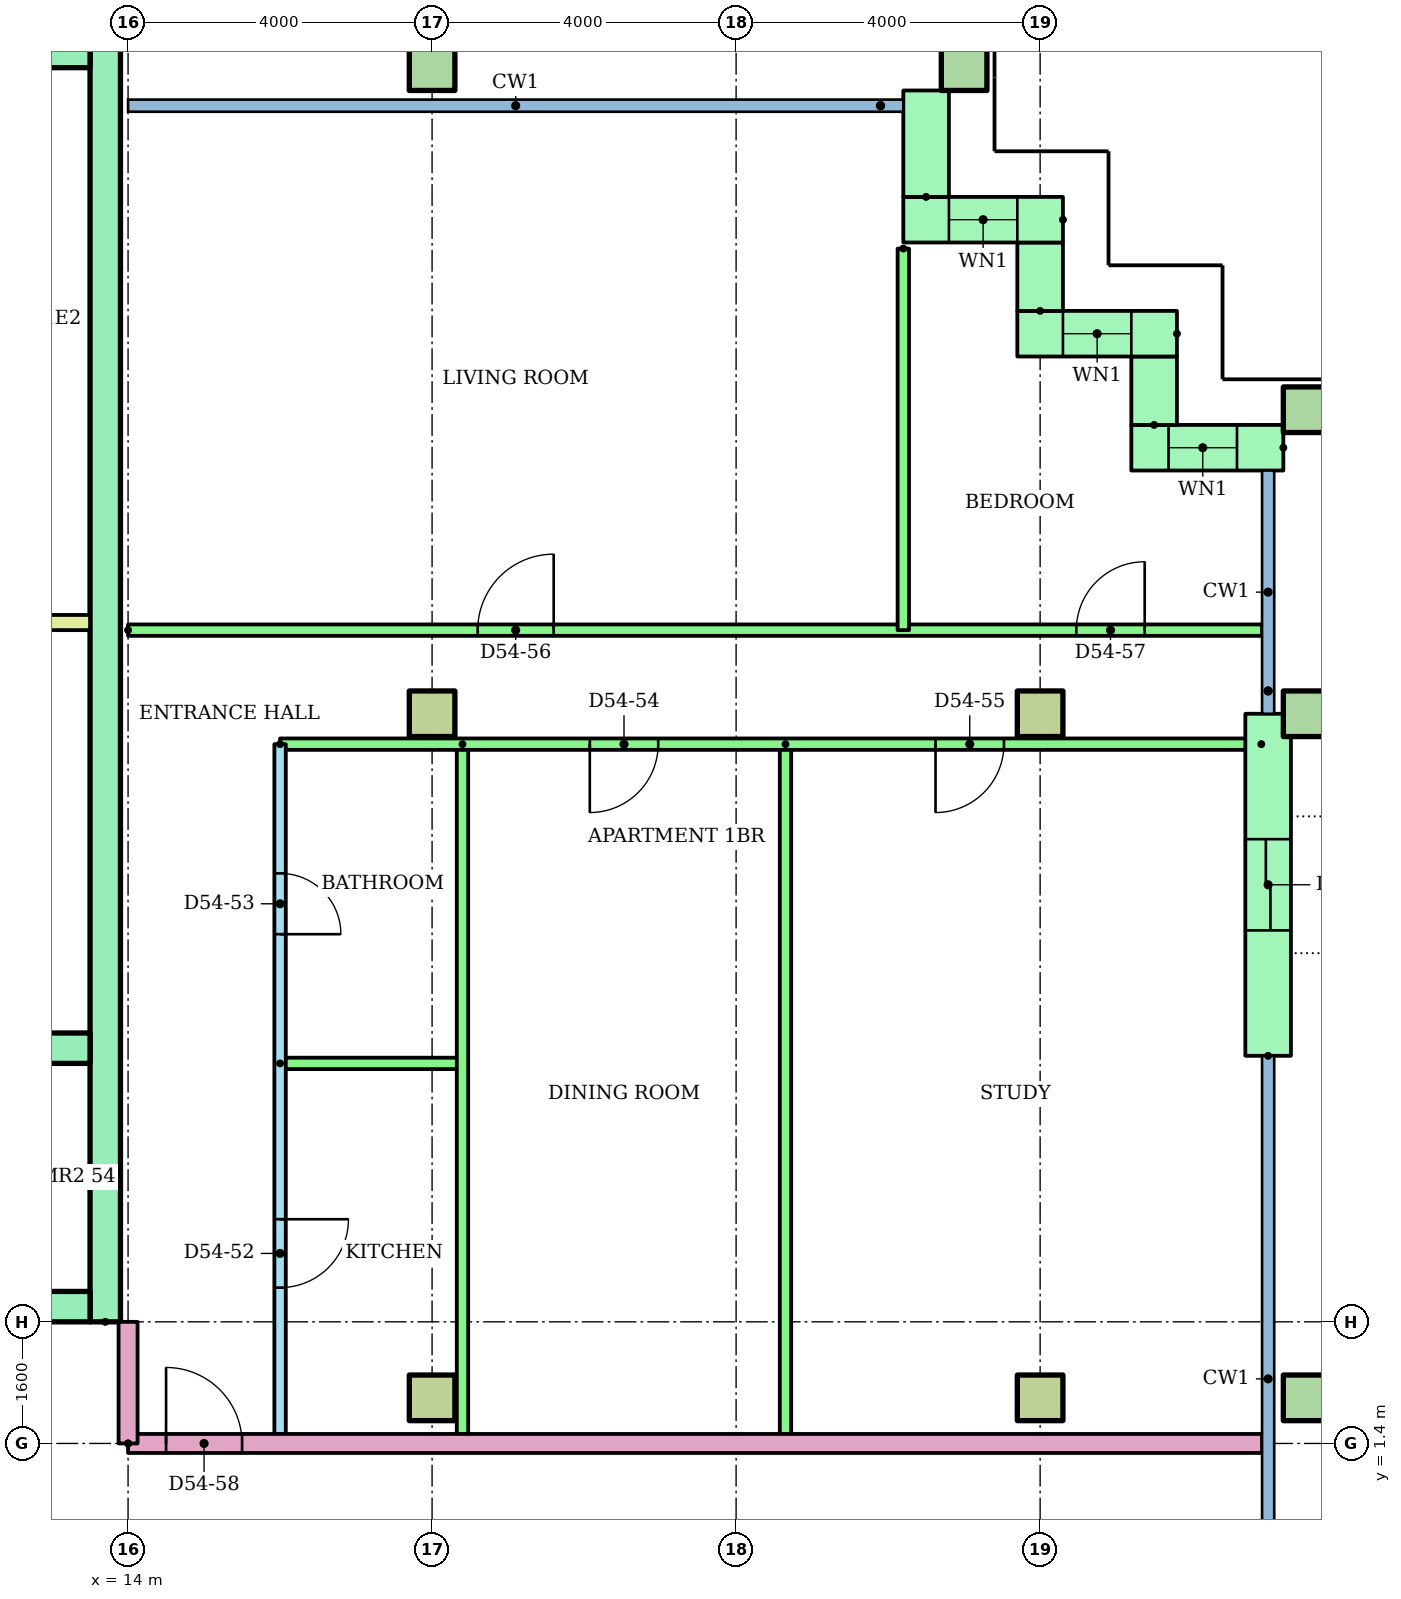
"""IFC4 building model, lengths in metres.
Left out: names, types, materials, properties, quantities, classifications, styles, units other than length and angle.
Written with IfcOpenShell. Run it as: python <this file> out.ifc"""

import sys

from ifc_helpers import new_model, si_unit, direction, frame, frame_2d, origin, origin_2d, place, context, subcontext, project, spatial, rectangle, hollow_rectangle, extrude, element, fill, save


model = new_model("IFC4")
c1 = context("Model", 3, precision=1e-05, world=origin(), true_north=direction((0.0, 1.0)))
c2 = subcontext(c1, "Body", "Model", "MODEL_VIEW")
j1 = project(units=[si_unit("LENGTHUNIT", "METRE"), si_unit("PLANEANGLEUNIT", "RADIAN")], contexts=[c1])
p1 = place(None, origin())
s1 = spatial("IfcSite", under=j1, at=p1, CompositionType="ELEMENT")
p2 = place(p1, origin())
s2 = spatial("IfcBuilding", under=s1, at=p2, CompositionType="ELEMENT")
p3 = place(p2, frame((0.0, 0.0, 210.8)))
s3 = spatial("IfcBuildingStorey", under=s2, at=p3, CompositionType="ELEMENT", Elevation=210.8)
for number, where in (
    (1, (18.0, 2.0, 0.0)),
    (2, (26.0, 2.0, 0.0)),
):
    element("IfcColumn", number, at=place(p3, frame(where)), inside=s3, PredefinedType="COLUMN", context=c2, shape_type="SweptSolid", body=[
        extrude(rectangle(XDim=0.6, YDim=0.6, at=origin_2d()), origin(), (0.0, 0.0, 1.0), 3.2),
    ])
p4 = place(p3, frame((29.5, 2.0, 0.0)))
e3 = element("IfcColumn", 3, at=p4, inside=s3, PredefinedType="COLUMN", context=c2, shape_type="SweptSolid", body=[
    extrude(hollow_rectangle(XDim=0.6, YDim=0.6, WallThickness=0.03, at=origin_2d()), origin(), (0.0, 0.0, 1.0), 3.2),
])
for number, where in (
    (4, (18.0, 11.0, 0.0)),
    (5, (26.0, 11.0, 0.0)),
):
    element("IfcColumn", number, at=place(p3, frame(where)), inside=s3, PredefinedType="COLUMN", context=c2, shape_type="SweptSolid", body=[
        extrude(rectangle(XDim=0.6, YDim=0.6, at=origin_2d()), origin(), (0.0, 0.0, 1.0), 3.2),
    ])
for number, where in (
    (6, (29.5, 11.0, 0.0)),
    (7, (29.5, 15.0, 0.0)),
    (8, (18.0, 19.5, 0.0)),
    (9, (25.0, 19.5, 0.0)),
):
    element("IfcColumn", number, at=place(p3, frame(where)), inside=s3, PredefinedType="COLUMN", context=c2, shape_type="SweptSolid", body=[
        extrude(hollow_rectangle(XDim=0.6, YDim=0.6, WallThickness=0.03, at=origin_2d()), origin(), (0.0, 0.0, 1.0), 3.2),
    ])
p5 = place(p3, frame((29.2, 14.5, 0.0), z_axis=(0.0, 0.0, 1.0), x_axis=(-1.0, 0.0, 0.0)))
e10 = element("IfcWall", 10, at=p5, inside=s3, PredefinedType="STANDARD", context=c2, shape_type="SweptSolid", body=[
    extrude(rectangle(XDim=2.0, YDim=0.6, at=frame_2d((1.0, 0.0))), origin(), (0.0, 0.0, 1.0), 2.92),
])
p6 = place(p5, frame((0.61, 0.0, 0.9)))
e11 = element("IfcOpeningElement", 11, at=p6, cuts=e10, PredefinedType="OPENING", context=c2, shape_type="SweptSolid", body=[
    extrude(rectangle(XDim=0.9, YDim=1.5, at=frame_2d((0.45, 0.75))), frame((0.0, 0.31, 0.0), z_axis=(0.0, -1.0, 0.0), x_axis=(1.0, 0.0, 0.0)), (0.0, 0.0, 1.0), 0.62),
])
p7 = place(p3, frame((27.5, 14.8, 0.0), z_axis=(0.0, 0.0, 1.0), x_axis=(0.0, 1.0, 0.0)))
e12 = element("IfcWall", 12, at=p7, inside=s3, PredefinedType="STANDARD", context=c2, shape_type="SweptSolid", body=[
    extrude(rectangle(XDim=0.9, YDim=0.6, at=frame_2d((0.45, 0.0))), origin(), (0.0, 0.0, 1.0), 2.92),
])
p8 = place(p3, frame((27.8, 16.0, 0.0), z_axis=(0.0, 0.0, 1.0), x_axis=(-1.0, 0.0, 0.0)))
e13 = element("IfcWall", 13, at=p8, inside=s3, PredefinedType="STANDARD", context=c2, shape_type="SweptSolid", body=[
    extrude(rectangle(XDim=2.1, YDim=0.6, at=frame_2d((1.05, 0.0))), origin(), (0.0, 0.0, 1.0), 2.92),
])
p9 = place(p8, frame((0.6, 0.0, 0.9)))
e14 = element("IfcOpeningElement", 14, at=p9, cuts=e13, PredefinedType="OPENING", context=c2, shape_type="SweptSolid", body=[
    extrude(rectangle(XDim=0.9, YDim=1.5, at=frame_2d((0.45, 0.75))), frame((0.0, 0.31, 0.0), z_axis=(0.0, -1.0, 0.0), x_axis=(1.0, 0.0, 0.0)), (0.0, 0.0, 1.0), 0.62),
])
p10 = place(p3, frame((26.0, 16.3, 0.0), z_axis=(0.0, 0.0, 1.0), x_axis=(0.0, 1.0, 0.0)))
e15 = element("IfcWall", 15, at=p10, inside=s3, PredefinedType="STANDARD", context=c2, shape_type="SweptSolid", body=[
    extrude(rectangle(XDim=0.9, YDim=0.6, at=frame_2d((0.45, 0.0))), origin(), (0.0, 0.0, 1.0), 2.92),
])
p11 = place(p3, frame((26.3, 17.5, 0.0), z_axis=(0.0, 0.0, 1.0), x_axis=(-1.0, 0.0, 0.0)))
e16 = element("IfcWall", 16, at=p11, inside=s3, PredefinedType="STANDARD", context=c2, shape_type="SweptSolid", body=[
    extrude(rectangle(XDim=2.1, YDim=0.6, at=frame_2d((1.05, 0.0))), origin(), (0.0, 0.0, 1.0), 2.92),
])
p12 = place(p11, frame((0.6, 0.0, 0.9)))
e17 = element("IfcOpeningElement", 17, at=p12, cuts=e16, PredefinedType="OPENING", context=c2, shape_type="SweptSolid", body=[
    extrude(rectangle(XDim=0.9, YDim=1.5, at=frame_2d((0.45, 0.75))), frame((0.0, 0.31, 0.0), z_axis=(0.0, -1.0, 0.0), x_axis=(1.0, 0.0, 0.0)), (0.0, 0.0, 1.0), 0.62),
])
p13 = place(p3, frame((24.5, 17.8, 0.0), z_axis=(0.0, 0.0, 1.0), x_axis=(0.0, 1.0, 0.0)))
e18 = element("IfcWall", 18, at=p13, inside=s3, PredefinedType="STANDARD", context=c2, shape_type="SweptSolid", body=[
    extrude(rectangle(XDim=1.4, YDim=0.6, at=frame_2d((0.7, 0.0))), origin(), (0.0, 0.0, 1.0), 2.92),
])
p14 = place(p3, frame((29.0, 6.5, 0.0), z_axis=(0.0, 0.0, 1.0), x_axis=(0.0, 1.0, 0.0)))
e19 = element("IfcWall", 19, at=p14, inside=s3, PredefinedType="STANDARD", context=c2, shape_type="SweptSolid", body=[
    extrude(rectangle(XDim=4.5, YDim=0.6, at=frame_2d((2.25, 0.0))), origin(), (0.0, 0.0, 1.0), 2.92),
])
p15 = place(p14, frame((1.65, 0.0, 0.0)))
e20 = element("IfcOpeningElement", 20, at=p15, cuts=e19, PredefinedType="OPENING", context=c2, shape_type="SweptSolid", body=[
    extrude(rectangle(XDim=1.2, YDim=2.1, at=frame_2d((0.6, 1.05))), frame((0.0, 0.31, 0.0), z_axis=(0.0, -1.0, 0.0), x_axis=(1.0, 0.0, 0.0)), (0.0, 0.0, 1.0), 0.62),
])
p16 = place(p3, frame((13.7, 3.0, 0.0), z_axis=(0.0, 0.0, 1.0), x_axis=(0.0, 1.0, 0.0)))
e21 = element("IfcWall", 21, at=p16, inside=s3, PredefinedType="SHEAR", context=c2, shape_type="SweptSolid", body=[
    extrude(rectangle(XDim=17.0, YDim=0.4, at=frame_2d((8.5, 0.0))), origin(), (0.0, 0.0, 1.0), 2.92),
])
p17 = place(p3, frame((-13.5, 19.7, 0.0)))
e22 = element("IfcWall", 22, at=p17, inside=s3, PredefinedType="SHEAR", context=c2, shape_type="SweptSolid", body=[
    extrude(rectangle(XDim=27.0, YDim=0.4, at=frame_2d((13.5, 0.0))), origin(), (0.0, 0.0, 1.0), 2.92),
])
p18 = place(p3, frame((-13.5, 3.2, 0.0)))
e23 = element("IfcWall", 23, at=p18, inside=s3, PredefinedType="SHEAR", context=c2, shape_type="SweptSolid", body=[
    extrude(rectangle(XDim=27.0, YDim=0.4, at=frame_2d((13.5, 0.0))), origin(), (0.0, 0.0, 1.0), 2.92),
])
p19 = place(p18, frame((22.083, 0.0, 0.0)))
e24 = element("IfcOpeningElement", 24, at=p19, cuts=e23, PredefinedType="OPENING", context=c2, shape_type="SweptSolid", body=[
    extrude(rectangle(XDim=1.1, YDim=2.1, at=frame_2d((0.55, 1.05))), frame((0.0, 0.21, 0.0), z_axis=(0.0, -1.0, 0.0), x_axis=(1.0, 0.0, 0.0)), (0.0, 0.0, 1.0), 0.42),
])
p20 = place(p18, frame((25.128, 0.0, 0.0)))
e25 = element("IfcOpeningElement", 25, at=p20, cuts=e23, PredefinedType="OPENING", context=c2, shape_type="SweptSolid", body=[
    extrude(rectangle(XDim=1.1, YDim=2.1, at=frame_2d((0.55, 1.05))), frame((0.0, 0.21, 0.0), z_axis=(0.0, -1.0, 0.0), x_axis=(1.0, 0.0, 0.0)), (0.0, 0.0, 1.0), 0.42),
])
p21 = place(p18, frame((12.6, 0.0, 0.0)))
e26 = element("IfcOpeningElement", 26, at=p21, cuts=e23, PredefinedType="OPENING", context=c2, shape_type="SweptSolid", body=[
    extrude(rectangle(XDim=1.8, YDim=2.1, at=frame_2d((0.9, 1.05))), frame((0.0, 0.21, 0.0), z_axis=(0.0, -1.0, 0.0), x_axis=(1.0, 0.0, 0.0)), (0.0, 0.0, 1.0), 0.42),
])
p22 = place(p3, frame((1.522, 6.6, 0.0)))
e27 = element("IfcWall", 27, at=p22, inside=s3, PredefinedType="SHEAR", context=c2, shape_type="SweptSolid", body=[
    extrude(rectangle(XDim=11.978, YDim=0.4, at=frame_2d((5.989, 0.0))), origin(), (0.0, 0.0, 1.0), 2.92),
])
p23 = place(p22, frame((2.544, 0.0, 0.0)))
e28 = element("IfcOpeningElement", 28, at=p23, cuts=e27, PredefinedType="OPENING", context=c2, shape_type="SweptSolid", body=[
    extrude(rectangle(XDim=1.0, YDim=2.1, at=frame_2d((0.5, 1.05))), frame((0.0, 0.21, 0.0), z_axis=(0.0, -1.0, 0.0), x_axis=(1.0, 0.0, 0.0)), (0.0, 0.0, 1.0), 0.42),
])
p24 = place(p3, frame((9.6, 12.2, 0.0)))
e29 = element("IfcWall", 29, at=p24, inside=s3, PredefinedType="PARTITIONING", context=c2, shape_type="SweptSolid", body=[
    extrude(rectangle(XDim=3.9, YDim=0.2, at=frame_2d((1.95, 0.0))), origin(), (0.0, 0.0, 1.0), 2.92),
])
p25 = place(p3, frame((16.0, 10.6, 0.0), z_axis=(0.0, 0.0, 1.0), x_axis=(0.0, -1.0, 0.0)))
e30 = element("IfcWall", 30, at=p25, inside=s3, PredefinedType="PARTITIONING", context=c2, shape_type="SweptSolid", body=[
    extrude(rectangle(XDim=9.2, YDim=0.15, at=frame_2d((4.6, 0.0))), origin(), (0.0, 0.0, 1.0), 2.4),
])
p26 = place(p25, frame((6.25, 0.0, 0.0)))
e31 = element("IfcOpeningElement", 31, at=p26, cuts=e30, PredefinedType="OPENING", context=c2, shape_type="SweptSolid", body=[
    extrude(rectangle(XDim=0.9, YDim=2.1, at=frame_2d((0.45, 1.05))), frame((0.0, 0.085, 0.0), z_axis=(0.0, -1.0, 0.0), x_axis=(1.0, 0.0, 0.0)), (0.0, 0.0, 1.0), 0.17),
])
p27 = place(p25, frame((1.7, 0.0, 0.0)))
e32 = element("IfcOpeningElement", 32, at=p27, cuts=e30, PredefinedType="OPENING", context=c2, shape_type="SweptSolid", body=[
    extrude(rectangle(XDim=0.8, YDim=2.1, at=frame_2d((0.4, 1.05))), frame((0.0, 0.085, 0.0), z_axis=(0.0, -1.0, 0.0), x_axis=(1.0, 0.0, 0.0)), (0.0, 0.0, 1.0), 0.17),
])
p28 = place(p3, frame((16.0, 6.4, 0.0)))
e33 = element("IfcWall", 33, at=p28, inside=s3, PredefinedType="PARTITIONING", context=c2, shape_type="SweptSolid", body=[
    extrude(rectangle(XDim=2.4, YDim=0.15, at=frame_2d((1.2, 0.0))), origin(), (0.0, 0.0, 1.0), 2.4),
])
for number, where, z_axis, x_axis in (
    (34, (18.4, 10.6, 0.0), (0.0, 0.0, 1.0), (0.0, -1.0, 0.0)),
    (35, (22.65, 10.6, 0.0), (0.0, 0.0, 1.0), (0.0, -1.0, 0.0)),
):
    element("IfcWall", number, at=place(p3, frame(where, z_axis=z_axis, x_axis=x_axis)), inside=s3, PredefinedType="PARTITIONING", context=c2, shape_type="SweptSolid", body=[
        extrude(rectangle(XDim=9.2, YDim=0.15, at=frame_2d((4.6, 0.0))), origin(), (0.0, 0.0, 1.0), 2.4),
    ])
p29 = place(p3, frame((28.91, 10.6, 0.0), z_axis=(0.0, 0.0, 1.0), x_axis=(-1.0, 0.0, 0.0)))
e36 = element("IfcWall", 36, at=p29, inside=s3, PredefinedType="PARTITIONING", context=c2, shape_type="SweptSolid", body=[
    extrude(rectangle(XDim=12.91, YDim=0.15, at=frame_2d((6.455, 0.0))), origin(), (0.0, 0.0, 1.0), 2.4),
])
p30 = place(p29, frame((7.935, 0.0, 0.0)))
e37 = element("IfcOpeningElement", 37, at=p30, cuts=e36, PredefinedType="OPENING", context=c2, shape_type="SweptSolid", body=[
    extrude(rectangle(XDim=0.9, YDim=2.1, at=frame_2d((0.45, 1.05))), frame((0.0, 0.085, 0.0), z_axis=(0.0, -1.0, 0.0), x_axis=(1.0, 0.0, 0.0)), (0.0, 0.0, 1.0), 0.17),
])
p31 = place(p29, frame((3.386, 0.0, 0.0)))
e38 = element("IfcOpeningElement", 38, at=p31, cuts=e36, PredefinedType="OPENING", context=c2, shape_type="SweptSolid", body=[
    extrude(rectangle(XDim=0.9, YDim=2.1, at=frame_2d((0.45, 1.05))), frame((0.0, 0.085, 0.0), z_axis=(0.0, -1.0, 0.0), x_axis=(1.0, 0.0, 0.0)), (0.0, 0.0, 1.0), 0.17),
])
p32 = place(p3, frame((14.0, 12.1, 0.0)))
e39 = element("IfcWall", 39, at=p32, inside=s3, PredefinedType="PARTITIONING", context=c2, shape_type="SweptSolid", body=[
    extrude(rectangle(XDim=14.92, YDim=0.15, at=frame_2d((7.46, 0.0))), origin(), (0.0, 0.0, 1.0), 2.4),
])
p33 = place(p32, frame((4.6, 0.0, 0.0)))
e40 = element("IfcOpeningElement", 40, at=p33, cuts=e39, PredefinedType="OPENING", context=c2, shape_type="SweptSolid", body=[
    extrude(rectangle(XDim=1.0, YDim=2.1, at=frame_2d((0.5, 1.05))), frame((0.0, 0.085, 0.0), z_axis=(0.0, -1.0, 0.0), x_axis=(1.0, 0.0, 0.0)), (0.0, 0.0, 1.0), 0.17),
])
p34 = place(p32, frame((12.476, 0.0, 0.0)))
e41 = element("IfcOpeningElement", 41, at=p34, cuts=e39, PredefinedType="OPENING", context=c2, shape_type="SweptSolid", body=[
    extrude(rectangle(XDim=0.9, YDim=2.1, at=frame_2d((0.45, 1.05))), frame((0.0, 0.085, 0.0), z_axis=(0.0, -1.0, 0.0), x_axis=(1.0, 0.0, 0.0)), (0.0, 0.0, 1.0), 0.17),
])
p35 = place(p3, frame((24.2, 17.12, 0.0), z_axis=(0.0, 0.0, 1.0), x_axis=(0.0, -1.0, 0.0)))
e42 = element("IfcWall", 42, at=p35, inside=s3, PredefinedType="PARTITIONING", context=c2, shape_type="SweptSolid", body=[
    extrude(rectangle(XDim=5.02, YDim=0.15, at=frame_2d((2.51, 0.0))), origin(), (0.0, 0.0, 1.0), 2.4),
])
p36 = place(p3, frame((14.0, 1.4, 0.0)))
e43 = element("IfcWall", 43, at=p36, inside=s3, PredefinedType="PARTITIONING", context=c2, shape_type="SweptSolid", body=[
    extrude(rectangle(XDim=14.92, YDim=0.25, at=frame_2d((7.46, 0.0))), origin(), (0.0, 0.0, 1.0), 2.4),
])
p37 = place(p36, frame((0.5, 0.0, 0.0)))
e44 = element("IfcOpeningElement", 44, at=p37, cuts=e43, PredefinedType="OPENING", context=c2, shape_type="SweptSolid", body=[
    extrude(rectangle(XDim=1.0, YDim=2.1, at=frame_2d((0.5, 1.05))), frame((0.0, 0.135, 0.0), z_axis=(0.0, -1.0, 0.0), x_axis=(1.0, 0.0, 0.0)), (0.0, 0.0, 1.0), 0.27),
])
p38 = place(p3, frame((14.0, 1.4, 0.0), z_axis=(0.0, 0.0, 1.0), x_axis=(0.0, 1.0, 0.0)))
e45 = element("IfcWall", 45, at=p38, inside=s3, PredefinedType="PARTITIONING", context=c2, shape_type="SweptSolid", body=[
    extrude(rectangle(XDim=1.6, YDim=0.25, at=frame_2d((0.8, 0.0))), origin(), (0.0, 0.0, 1.0), 2.4),
])
p39 = place(p6, origin())
e46 = element("IfcWindow", 46, at=p39, inside=s3, PartitioningType="SINGLE_PANEL", PredefinedType="WINDOW", context=c2, shape_type="SweptSolid", body=[
    extrude(rectangle(XDim=0.9, YDim=1.5, at=frame_2d((0.45, 0.75))), frame((0.0, 0.03, 0.0), z_axis=(0.0, -1.0, 0.0), x_axis=(1.0, 0.0, 0.0)), (0.0, 0.0, 1.0), 0.06),
])
fill(e11, e46)
p40 = place(p9, origin())
e47 = element("IfcWindow", 47, at=p40, inside=s3, PartitioningType="SINGLE_PANEL", PredefinedType="WINDOW", context=c2, shape_type="SweptSolid", body=[
    extrude(rectangle(XDim=0.9, YDim=1.5, at=frame_2d((0.45, 0.75))), frame((0.0, 0.03, 0.0), z_axis=(0.0, -1.0, 0.0), x_axis=(1.0, 0.0, 0.0)), (0.0, 0.0, 1.0), 0.06),
])
fill(e14, e47)
p41 = place(p12, origin())
e48 = element("IfcWindow", 48, at=p41, inside=s3, PartitioningType="SINGLE_PANEL", PredefinedType="WINDOW", context=c2, shape_type="SweptSolid", body=[
    extrude(rectangle(XDim=0.9, YDim=1.5, at=frame_2d((0.45, 0.75))), frame((0.0, 0.03, 0.0), z_axis=(0.0, -1.0, 0.0), x_axis=(1.0, 0.0, 0.0)), (0.0, 0.0, 1.0), 0.06),
])
fill(e17, e48)
p42 = place(p26, origin())
e49 = element("IfcDoor", 49, at=p42, inside=s3, OperationType="SINGLE_SWING_LEFT", PredefinedType="DOOR", context=c2, shape_type="SweptSolid", body=[
    extrude(rectangle(XDim=0.9, YDim=2.1, at=frame_2d((0.45, 1.05))), frame((0.0, 0.025, 0.0), z_axis=(0.0, -1.0, 0.0), x_axis=(1.0, 0.0, 0.0)), (0.0, 0.0, 1.0), 0.05),
])
fill(e31, e49)
p43 = place(p27, origin())
e50 = element("IfcDoor", 50, at=p43, inside=s3, OperationType="SINGLE_SWING_RIGHT", PredefinedType="DOOR", context=c2, shape_type="SweptSolid", body=[
    extrude(rectangle(XDim=0.8, YDim=2.1, at=frame_2d((0.4, 1.05))), frame((0.0, 0.025, 0.0), z_axis=(0.0, -1.0, 0.0), x_axis=(1.0, 0.0, 0.0)), (0.0, 0.0, 1.0), 0.05),
])
fill(e32, e50)
p44 = place(p30, origin())
e51 = element("IfcDoor", 51, at=p44, inside=s3, OperationType="SINGLE_SWING_RIGHT", PredefinedType="DOOR", context=c2, shape_type="SweptSolid", body=[
    extrude(rectangle(XDim=0.9, YDim=2.1, at=frame_2d((0.45, 1.05))), frame((0.0, 0.025, 0.0), z_axis=(0.0, -1.0, 0.0), x_axis=(1.0, 0.0, 0.0)), (0.0, 0.0, 1.0), 0.05),
])
fill(e37, e51)
p45 = place(p31, origin())
e52 = element("IfcDoor", 52, at=p45, inside=s3, OperationType="SINGLE_SWING_RIGHT", PredefinedType="DOOR", context=c2, shape_type="SweptSolid", body=[
    extrude(rectangle(XDim=0.9, YDim=2.1, at=frame_2d((0.45, 1.05))), frame((0.0, 0.025, 0.0), z_axis=(0.0, -1.0, 0.0), x_axis=(1.0, 0.0, 0.0)), (0.0, 0.0, 1.0), 0.05),
])
fill(e38, e52)
p46 = place(p33, origin())
e53 = element("IfcDoor", 53, at=p46, inside=s3, OperationType="SINGLE_SWING_RIGHT", PredefinedType="DOOR", context=c2, shape_type="SweptSolid", body=[
    extrude(rectangle(XDim=1.0, YDim=2.1, at=frame_2d((0.5, 1.05))), frame((0.0, 0.025, 0.0), z_axis=(0.0, -1.0, 0.0), x_axis=(1.0, 0.0, 0.0)), (0.0, 0.0, 1.0), 0.05),
])
fill(e40, e53)
p47 = place(p34, origin())
e54 = element("IfcDoor", 54, at=p47, inside=s3, OperationType="SINGLE_SWING_RIGHT", PredefinedType="DOOR", context=c2, shape_type="SweptSolid", body=[
    extrude(rectangle(XDim=0.9, YDim=2.1, at=frame_2d((0.45, 1.05))), frame((0.0, 0.025, 0.0), z_axis=(0.0, -1.0, 0.0), x_axis=(1.0, 0.0, 0.0)), (0.0, 0.0, 1.0), 0.05),
])
fill(e41, e54)
p48 = place(p37, origin())
e55 = element("IfcDoor", 55, at=p48, inside=s3, OperationType="SINGLE_SWING_LEFT", PredefinedType="DOOR", context=c2, shape_type="SweptSolid", body=[
    extrude(rectangle(XDim=1.0, YDim=2.1, at=frame_2d((0.5, 1.05))), frame((0.0, 0.025, 0.0), z_axis=(0.0, -1.0, 0.0), x_axis=(1.0, 0.0, 0.0)), (0.0, 0.0, 1.0), 0.05),
])
fill(e44, e55)
p49 = place(p15, origin())
e56 = element("IfcDoor", 56, at=p49, inside=s3, OperationType="SLIDING_TO_LEFT", PredefinedType="DOOR", context=c2, shape_type="SweptSolid", body=[
    extrude(rectangle(XDim=1.2, YDim=2.1, at=frame_2d((0.6, 1.05))), frame((0.0, 0.025, 0.0), z_axis=(0.0, -1.0, 0.0), x_axis=(1.0, 0.0, 0.0)), (0.0, 0.0, 1.0), 0.05),
])
fill(e20, e56)
save(model, sys.argv[1])
